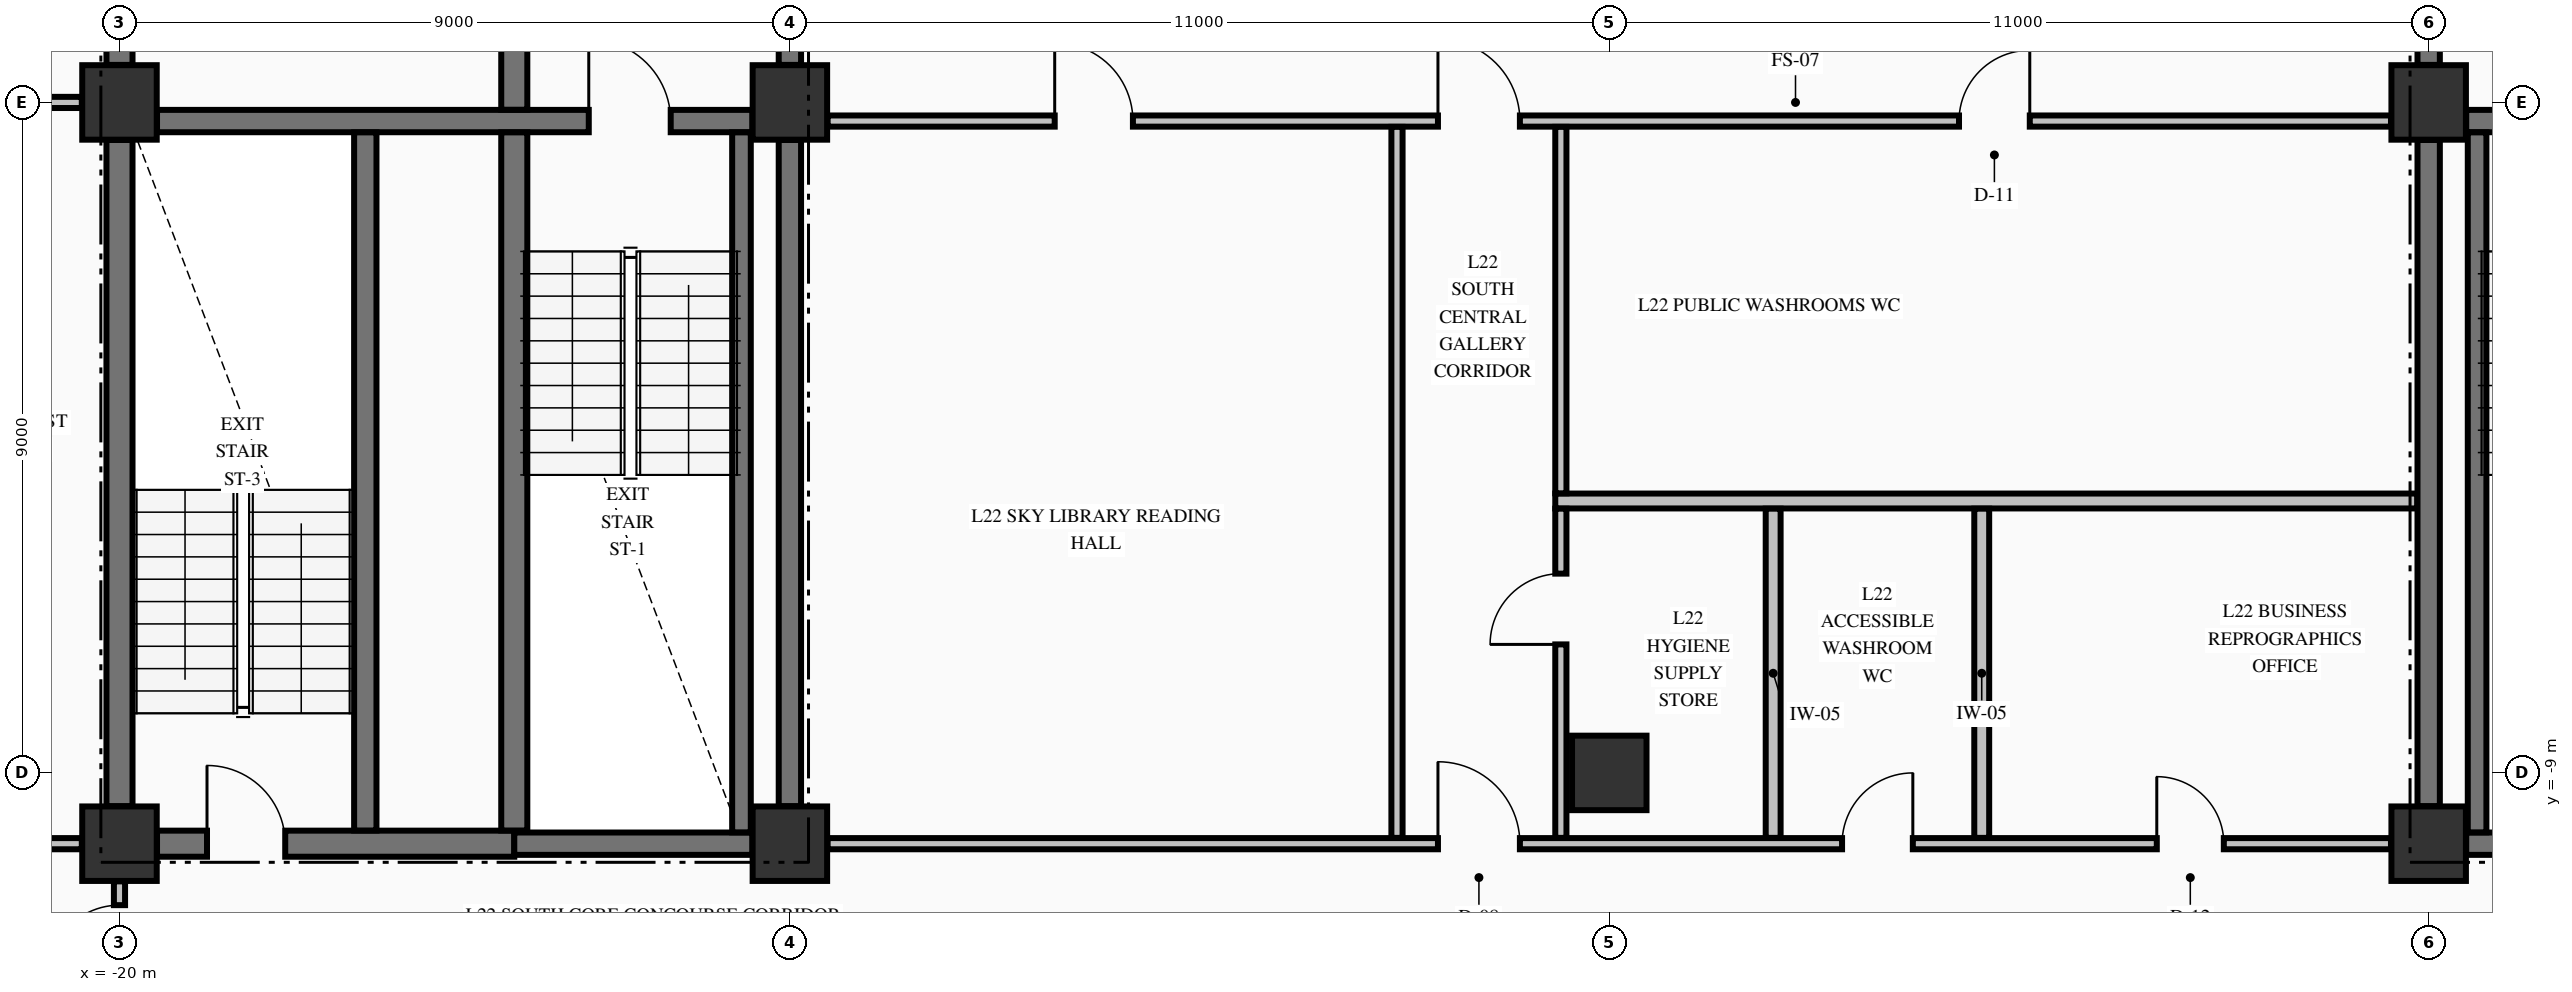
"""IFC4 building model, lengths in metres.
Left out: names, types, materials, properties, quantities, classifications, styles, units other than length and angle.
Written with IfcOpenShell. Run it as: python <this file> out.ifc"""

import sys

from ifc_helpers import new_model, si_unit, direction, frame, frame_2d, origin, origin_2d, place, context, subcontext, project, spatial, rectangle, extrude, element, fill, save


model = new_model("IFC4")
c1 = context("Model", 3, precision=1e-05, world=origin(), true_north=direction((0.0, 1.0)))
c2 = subcontext(c1, "Body", "Model", "MODEL_VIEW")
j1 = project(units=[si_unit("LENGTHUNIT", "METRE"), si_unit("PLANEANGLEUNIT", "RADIAN")], contexts=[c1])
p1 = place(None, origin())
s1 = spatial("IfcSite", under=j1, at=p1, CompositionType="ELEMENT")
p2 = place(p1, origin())
s2 = spatial("IfcBuilding", under=s1, at=p2, CompositionType="ELEMENT")
p3 = place(p2, frame((0.0, 0.0, 91.36)))
s3 = spatial("IfcBuildingStorey", under=s2, at=p3, CompositionType="ELEMENT", Elevation=91.36)
for number, where, z_axis, x_axis in (
    (1, (-20.0, -9.95, -0.25), (0.0, 0.0, 1.0), (1.0, 0.0, 0.0)),
    (2, (-11.0, -9.95, -0.25), (0.0, 0.0, 1.0), (1.0, 0.0, 0.0)),
    (3, (-11.0, 0.0, -0.25), (0.0, 0.0, 1.0), (1.0, 0.0, 0.0)),
    (4, (11.0, -9.95, -0.25), (0.0, 0.0, 1.0), (1.0, 0.0, 0.0)),
    (5, (11.0, 0.0, -0.25), (0.0, 0.0, 1.0), (1.0, 0.0, 0.0)),
    (6, (0.0, -9.0, -0.25), (0.0, 0.0, 1.0), (1.0, 0.0, 0.0)),
    (7, (-20.0, 0.0, -0.25), (0.0, 0.0, 1.0), (1.0, 0.0, 0.0)),
):
    element("IfcColumn", number, at=place(p3, frame(where, z_axis=z_axis, x_axis=x_axis)), inside=s3, PredefinedType="COLUMN", context=c2, shape_type="SweptSolid", body=[
        extrude(rectangle(XDim=1.0, YDim=1.0, at=origin_2d()), origin(), (0.0, 0.0, 1.0), 3.57),
    ])
p4 = place(p3, frame((-19.496, -9.95, 0.0), z_axis=(0.0, 0.0, 1.0), x_axis=(1.0, 0.0, 0.0)))
e8 = element("IfcWall", 8, at=p4, inside=s3, PredefinedType="SHEAR", context=c2, shape_type="SweptSolid", body=[
    extrude(rectangle(XDim=4.796, YDim=0.35, at=frame_2d((2.398, 0.0))), origin(), (0.0, 0.0, 1.0), 3.32),
])
p5 = place(p4, frame((0.671, 0.0, 0.0)))
e9 = element("IfcOpeningElement", 9, at=p5, cuts=e8, PredefinedType="OPENING", context=c2, shape_type="SweptSolid", body=[
    extrude(rectangle(XDim=1.05, YDim=2.15, at=frame_2d((0.525, 1.075))), frame((0.0, 0.185, 0.0), z_axis=(0.0, -1.0, 0.0), x_axis=(1.0, 0.0, 0.0)), (0.0, 0.0, 1.0), 0.37),
])
for number, where, z_axis, x_axis in (
    (10, (-14.7, -9.95, 0.0), (0.0, 0.0, 1.0), (1.0, 0.0, 0.0)),
    (11, (11.504, -9.95, 0.0), (0.0, 0.0, 1.0), (1.0, 0.0, 0.0)),
):
    element("IfcWall", number, at=place(p3, frame(where, z_axis=z_axis, x_axis=x_axis)), inside=s3, PredefinedType="SHEAR", context=c2, shape_type="SweptSolid", body=[
        extrude(rectangle(XDim=3.196, YDim=0.3, at=frame_2d((1.598, 0.0))), origin(), (0.0, 0.0, 1.0), 3.32),
    ])
p6 = place(p3, frame((-19.496, -0.25, 0.0), z_axis=(0.0, 0.0, 1.0), x_axis=(1.0, 0.0, 0.0)))
e12 = element("IfcWall", 12, at=p6, inside=s3, PredefinedType="SHEAR", context=c2, shape_type="SweptSolid", body=[
    extrude(rectangle(XDim=7.992, YDim=0.3, at=frame_2d((3.996, 0.0))), origin(), (0.0, 0.0, 1.0), 3.32),
])
p7 = place(p6, frame((5.796, 0.0, 0.0)))
e13 = element("IfcOpeningElement", 13, at=p7, cuts=e12, PredefinedType="OPENING", context=c2, shape_type="SweptSolid", body=[
    extrude(rectangle(XDim=1.1, YDim=2.15, at=frame_2d((0.55, 1.075))), frame((0.0, 0.16, 0.0), z_axis=(0.0, -1.0, 0.0), x_axis=(1.0, 0.0, 0.0)), (0.0, 0.0, 1.0), 0.32),
])
p8 = place(p3, frame((11.504, -0.25, 0.0), z_axis=(0.0, 0.0, 1.0), x_axis=(1.0, 0.0, 0.0)))
e14 = element("IfcWall", 14, at=p8, inside=s3, PredefinedType="SHEAR", context=c2, shape_type="SweptSolid", body=[
    extrude(rectangle(XDim=3.371, YDim=0.3, at=frame_2d((1.686, 0.0))), origin(), (0.0, 0.0, 1.0), 3.32),
])
p9 = place(p8, frame((1.096, 0.0, 0.0)))
e15 = element("IfcOpeningElement", 15, at=p9, cuts=e14, PredefinedType="OPENING", context=c2, shape_type="SweptSolid", body=[
    extrude(rectangle(XDim=1.1, YDim=2.15, at=frame_2d((0.55, 1.075))), frame((0.0, 0.16, 0.0), z_axis=(0.0, -1.0, 0.0), x_axis=(1.0, 0.0, 0.0)), (0.0, 0.0, 1.0), 0.32),
])
p10 = place(p3, frame((-22.835, -9.95, 0.0), z_axis=(0.0, 0.0, 1.0), x_axis=(1.0, 0.0, 0.0)))
e16 = element("IfcWall", 16, at=p10, inside=s3, PredefinedType="PARTITIONING", context=c2, shape_type="SweptSolid", body=[
    extrude(rectangle(XDim=2.329, YDim=0.15, at=frame_2d((1.165, 0.0))), origin(), (0.0, 0.0, 1.0), 3.32),
])
p11 = place(p10, frame((0.86, 0.0, 0.0)))
e17 = element("IfcOpeningElement", 17, at=p11, cuts=e16, PredefinedType="OPENING", context=c2, shape_type="SweptSolid", body=[
    extrude(rectangle(XDim=0.95, YDim=2.15, at=frame_2d((0.475, 1.075))), frame((0.0, 0.085, 0.0), z_axis=(0.0, -1.0, 0.0), x_axis=(1.0, 0.0, 0.0)), (0.0, 0.0, 1.0), 0.17),
])
p12 = place(p3, frame((-10.494, -9.95, 0.0), z_axis=(0.0, 0.0, 1.0), x_axis=(1.0, 0.0, 0.0)))
e18 = element("IfcWall", 18, at=p12, inside=s3, PredefinedType="PARTITIONING", context=c2, shape_type="SweptSolid", body=[
    extrude(rectangle(XDim=20.988, YDim=0.15, at=frame_2d((10.494, 0.0))), origin(), (0.0, 0.0, 1.0), 3.32),
])
p13 = place(p12, frame((8.194, 0.0, 0.0)))
e19 = element("IfcOpeningElement", 19, at=p13, cuts=e18, PredefinedType="OPENING", context=c2, shape_type="SweptSolid", body=[
    extrude(rectangle(XDim=1.1, YDim=2.15, at=frame_2d((0.55, 1.075))), frame((0.0, 0.085, 0.0), z_axis=(0.0, -1.0, 0.0), x_axis=(1.0, 0.0, 0.0)), (0.0, 0.0, 1.0), 0.17),
])
p14 = place(p12, frame((13.619, 0.0, 0.0)))
e20 = element("IfcOpeningElement", 20, at=p14, cuts=e18, PredefinedType="OPENING", context=c2, shape_type="SweptSolid", body=[
    extrude(rectangle(XDim=0.95, YDim=2.15, at=frame_2d((0.475, 1.075))), frame((0.0, 0.085, 0.0), z_axis=(0.0, -1.0, 0.0), x_axis=(1.0, 0.0, 0.0)), (0.0, 0.0, 1.0), 0.17),
])
p15 = place(p12, frame((17.844, 0.0, 0.0)))
e21 = element("IfcOpeningElement", 21, at=p15, cuts=e18, PredefinedType="OPENING", context=c2, shape_type="SweptSolid", body=[
    extrude(rectangle(XDim=0.9, YDim=2.15, at=frame_2d((0.45, 1.075))), frame((0.0, 0.085, 0.0), z_axis=(0.0, -1.0, 0.0), x_axis=(1.0, 0.0, 0.0)), (0.0, 0.0, 1.0), 0.17),
])
p16 = place(p3, frame((-0.725, -5.35, 0.0), z_axis=(0.0, 0.0, 1.0), x_axis=(1.0, 0.0, 0.0)))
e22 = element("IfcWall", 22, at=p16, inside=s3, PredefinedType="PARTITIONING", context=c2, shape_type="SweptSolid", body=[
    extrude(rectangle(XDim=11.572, YDim=0.2, at=frame_2d((5.786, 0.0))), origin(), (0.0, 0.0, 1.0), 3.32),
])
p17 = place(p3, frame((-10.494, -0.25, 0.0), z_axis=(0.0, 0.0, 1.0), x_axis=(1.0, 0.0, 0.0)))
e23 = element("IfcWall", 23, at=p17, inside=s3, PredefinedType="PARTITIONING", context=c2, shape_type="SweptSolid", body=[
    extrude(rectangle(XDim=20.988, YDim=0.15, at=frame_2d((10.494, 0.0))), origin(), (0.0, 0.0, 1.0), 3.32),
])
p18 = place(p17, frame((8.194, 0.0, 0.0)))
e24 = element("IfcOpeningElement", 24, at=p18, cuts=e23, PredefinedType="OPENING", context=c2, shape_type="SweptSolid", body=[
    extrude(rectangle(XDim=1.1, YDim=2.15, at=frame_2d((0.55, 1.075))), frame((0.0, 0.085, 0.0), z_axis=(0.0, -1.0, 0.0), x_axis=(1.0, 0.0, 0.0)), (0.0, 0.0, 1.0), 0.17),
])
p19 = place(p17, frame((3.049, 0.0, 0.0)))
e25 = element("IfcOpeningElement", 25, at=p19, cuts=e23, PredefinedType="OPENING", context=c2, shape_type="SweptSolid", body=[
    extrude(rectangle(XDim=1.05, YDim=2.15, at=frame_2d((0.525, 1.075))), frame((0.0, 0.085, 0.0), z_axis=(0.0, -1.0, 0.0), x_axis=(1.0, 0.0, 0.0)), (0.0, 0.0, 1.0), 0.17),
])
p20 = place(p17, frame((15.189, 0.0, 0.0)))
e26 = element("IfcOpeningElement", 26, at=p20, cuts=e23, PredefinedType="OPENING", context=c2, shape_type="SweptSolid", body=[
    extrude(rectangle(XDim=0.95, YDim=2.15, at=frame_2d((0.475, 1.075))), frame((0.0, 0.085, 0.0), z_axis=(0.0, -1.0, 0.0), x_axis=(1.0, 0.0, 0.0)), (0.0, 0.0, 1.0), 0.17),
])
p21 = place(p3, frame((-22.394, 0.0, 0.0), z_axis=(0.0, 0.0, 1.0), x_axis=(1.0, 0.0, 0.0)))
e27 = element("IfcWall", 27, at=p21, inside=s3, PredefinedType="PARTITIONING", context=c2, shape_type="SweptSolid", body=[
    extrude(rectangle(XDim=1.888, YDim=0.15, at=frame_2d((0.944, 0.0))), origin(), (0.0, 0.0, 1.0), 2.81),
])
p22 = place(p3, frame((-20.0, -9.446, 0.0), z_axis=(0.0, 0.0, 1.0), x_axis=(0.0, 1.0, 0.0)))
e28 = element("IfcWall", 28, at=p22, inside=s3, PredefinedType="SHEAR", context=c2, shape_type="SweptSolid", body=[
    extrude(rectangle(XDim=8.942, YDim=0.35, at=frame_2d((4.471, 0.0))), origin(), (0.0, 0.0, 1.0), 3.32),
])
p23 = place(p3, frame((-20.0, 0.504, 0.0), z_axis=(0.0, 0.0, 1.0), x_axis=(0.0, 1.0, 0.0)))
e29 = element("IfcWall", 29, at=p23, inside=s3, PredefinedType="SHEAR", context=c2, shape_type="SweptSolid", body=[
    extrude(rectangle(XDim=9.492, YDim=0.35, at=frame_2d((4.746, 0.0))), origin(), (0.0, 0.0, 1.0), 3.32),
])
p24 = place(p3, frame((-16.7, -9.773, 0.0), z_axis=(0.0, 0.0, 1.0), x_axis=(0.0, 1.0, 0.0)))
e30 = element("IfcWall", 30, at=p24, inside=s3, PredefinedType="SHEAR", context=c2, shape_type="SweptSolid", body=[
    extrude(rectangle(XDim=9.371, YDim=0.3, at=frame_2d((4.686, 0.0))), origin(), (0.0, 0.0, 1.0), 3.32),
])
p25 = place(p3, frame((-14.7, -9.773, 0.0), z_axis=(0.0, 0.0, 1.0), x_axis=(0.0, 1.0, 0.0)))
e31 = element("IfcWall", 31, at=p25, inside=s3, PredefinedType="SHEAR", context=c2, shape_type="SweptSolid", body=[
    extrude(rectangle(XDim=9.371, YDim=0.35, at=frame_2d((4.686, 0.0))), origin(), (0.0, 0.0, 1.0), 3.32),
])
p26 = place(p3, frame((-14.7, -0.098, 0.0), z_axis=(0.0, 0.0, 1.0), x_axis=(0.0, 1.0, 0.0)))
e32 = element("IfcWall", 32, at=p26, inside=s3, PredefinedType="SHEAR", context=c2, shape_type="SweptSolid", body=[
    extrude(rectangle(XDim=2.846, YDim=0.35, at=frame_2d((1.423, 0.0))), origin(), (0.0, 0.0, 1.0), 3.32),
])
p27 = place(p3, frame((-11.65, -9.798, 0.0), z_axis=(0.0, 0.0, 1.0), x_axis=(0.0, 1.0, 0.0)))
e33 = element("IfcWall", 33, at=p27, inside=s3, PredefinedType="SOLIDWALL", context=c2, shape_type="SweptSolid", body=[
    extrude(rectangle(XDim=9.396, YDim=0.25, at=frame_2d((4.698, 0.0))), origin(), (0.0, 0.0, 1.0), 3.32),
])
p28 = place(p3, frame((-11.0, -9.446, 0.0), z_axis=(0.0, 0.0, 1.0), x_axis=(0.0, 1.0, 0.0)))
e34 = element("IfcWall", 34, at=p28, inside=s3, PredefinedType="SHEAR", context=c2, shape_type="SweptSolid", body=[
    extrude(rectangle(XDim=8.942, YDim=0.3, at=frame_2d((4.471, 0.0))), origin(), (0.0, 0.0, 1.0), 3.32),
])
p29 = place(p3, frame((-11.0, 0.504, 0.0), z_axis=(0.0, 0.0, 1.0), x_axis=(0.0, 1.0, 0.0)))
e35 = element("IfcWall", 35, at=p29, inside=s3, PredefinedType="SHEAR", context=c2, shape_type="SweptSolid", body=[
    extrude(rectangle(XDim=2.244, YDim=0.3, at=frame_2d((1.122, 0.0))), origin(), (0.0, 0.0, 1.0), 3.32),
])
p30 = place(p29, frame((0.596, 0.0, 0.0)))
e36 = element("IfcOpeningElement", 36, at=p30, cuts=e35, PredefinedType="OPENING", context=c2, shape_type="SweptSolid", body=[
    extrude(rectangle(XDim=1.1, YDim=2.15, at=frame_2d((0.55, 1.075))), frame((0.0, 0.16, 0.0), z_axis=(0.0, -1.0, 0.0), x_axis=(1.0, 0.0, 0.0)), (0.0, 0.0, 1.0), 0.32),
])
p31 = place(p3, frame((11.0, -9.446, 0.0), z_axis=(0.0, 0.0, 1.0), x_axis=(0.0, 1.0, 0.0)))
e37 = element("IfcWall", 37, at=p31, inside=s3, PredefinedType="SHEAR", context=c2, shape_type="SweptSolid", body=[
    extrude(rectangle(XDim=8.942, YDim=0.3, at=frame_2d((4.471, 0.0))), origin(), (0.0, 0.0, 1.0), 3.32),
])
p32 = place(p3, frame((11.0, 0.504, 0.0), z_axis=(0.0, 0.0, 1.0), x_axis=(0.0, 1.0, 0.0)))
e38 = element("IfcWall", 38, at=p32, inside=s3, PredefinedType="SHEAR", context=c2, shape_type="SweptSolid", body=[
    extrude(rectangle(XDim=2.244, YDim=0.3, at=frame_2d((1.122, 0.0))), origin(), (0.0, 0.0, 1.0), 3.32),
])
p33 = place(p32, frame((0.596, 0.0, 0.0)))
e39 = element("IfcOpeningElement", 39, at=p33, cuts=e38, PredefinedType="OPENING", context=c2, shape_type="SweptSolid", body=[
    extrude(rectangle(XDim=1.1, YDim=2.15, at=frame_2d((0.55, 1.075))), frame((0.0, 0.16, 0.0), z_axis=(0.0, -1.0, 0.0), x_axis=(1.0, 0.0, 0.0)), (0.0, 0.0, 1.0), 0.32),
])
p34 = place(p3, frame((11.65, -9.798, 0.0), z_axis=(0.0, 0.0, 1.0), x_axis=(0.0, 1.0, 0.0)))
e40 = element("IfcWall", 40, at=p34, inside=s3, PredefinedType="SOLIDWALL", context=c2, shape_type="SweptSolid", body=[
    extrude(rectangle(XDim=9.396, YDim=0.25, at=frame_2d((4.698, 0.0))), origin(), (0.0, 0.0, 1.0), 3.32),
])
p35 = place(p3, frame((-20.0, -12.472, 0.0), z_axis=(0.0, 0.0, 1.0), x_axis=(0.0, 1.0, 0.0)))
e41 = element("IfcWall", 41, at=p35, inside=s3, PredefinedType="PARTITIONING", context=c2, shape_type="SweptSolid", body=[
    extrude(rectangle(XDim=2.016, YDim=0.15, at=frame_2d((1.008, 0.0))), origin(), (0.0, 0.0, 1.0), 2.81),
])
p36 = place(p35, frame((0.747, 0.0, 0.0)))
e42 = element("IfcOpeningElement", 42, at=p36, cuts=e41, PredefinedType="OPENING", context=c2, shape_type="SweptSolid", body=[
    extrude(rectangle(XDim=0.95, YDim=2.15, at=frame_2d((0.475, 1.075))), frame((0.0, 0.085, 0.0), z_axis=(0.0, -1.0, 0.0), x_axis=(1.0, 0.0, 0.0)), (0.0, 0.0, 1.0), 0.17),
])
p37 = place(p3, frame((-2.85, -9.872, 0.0), z_axis=(0.0, 0.0, 1.0), x_axis=(0.0, 1.0, 0.0)))
e43 = element("IfcWall", 43, at=p37, inside=s3, PredefinedType="PARTITIONING", context=c2, shape_type="SweptSolid", body=[
    extrude(rectangle(XDim=9.544, YDim=0.15, at=frame_2d((4.772, 0.0))), origin(), (0.0, 0.0, 1.0), 3.32),
])
p38 = place(p3, frame((-0.65, -9.872, 0.0), z_axis=(0.0, 0.0, 1.0), x_axis=(0.0, 1.0, 0.0)))
e44 = element("IfcWall", 44, at=p38, inside=s3, PredefinedType="PARTITIONING", context=c2, shape_type="SweptSolid", body=[
    extrude(rectangle(XDim=4.419, YDim=0.15, at=frame_2d((2.209, 0.0))), origin(), (0.0, 0.0, 1.0), 3.32),
])
p39 = place(p38, frame((2.597, 0.0, 0.0)))
e45 = element("IfcOpeningElement", 45, at=p39, cuts=e44, PredefinedType="OPENING", context=c2, shape_type="SweptSolid", body=[
    extrude(rectangle(XDim=0.95, YDim=2.15, at=frame_2d((0.475, 1.075))), frame((0.0, 0.085, 0.0), z_axis=(0.0, -1.0, 0.0), x_axis=(1.0, 0.0, 0.0)), (0.0, 0.0, 1.0), 0.17),
])
p40 = place(p3, frame((-0.65, -5.247, 0.0), z_axis=(0.0, 0.0, 1.0), x_axis=(0.0, 1.0, 0.0)))
e46 = element("IfcWall", 46, at=p40, inside=s3, PredefinedType="PARTITIONING", context=c2, shape_type="SweptSolid", body=[
    extrude(rectangle(XDim=4.919, YDim=0.15, at=frame_2d((2.459, 0.0))), origin(), (0.0, 0.0, 1.0), 3.32),
])
for number, where, z_axis, x_axis in (
    (47, (2.2, -9.872, 0.0), (0.0, 0.0, 1.0), (0.0, 1.0, 0.0)),
    (48, (5.0, -9.872, 0.0), (0.0, 0.0, 1.0), (0.0, 1.0, 0.0)),
):
    element("IfcWall", number, at=place(p3, frame(where, z_axis=z_axis, x_axis=x_axis)), inside=s3, PredefinedType="PARTITIONING", context=c2, shape_type="SweptSolid", body=[
        extrude(rectangle(XDim=4.419, YDim=0.2, at=frame_2d((2.209, 0.0))), origin(), (0.0, 0.0, 1.0), 3.32),
    ])
p41 = place(p7, origin())
e49 = element("IfcDoor", 49, at=p41, inside=s3, OperationType="SINGLE_SWING_LEFT", PredefinedType="DOOR", context=c2, shape_type="SweptSolid", body=[
    extrude(rectangle(XDim=1.1, YDim=2.15, at=frame_2d((0.55, 1.075))), frame((0.0, 0.025, 0.0), z_axis=(0.0, -1.0, 0.0), x_axis=(1.0, 0.0, 0.0)), (0.0, 0.0, 1.0), 0.05),
])
fill(e13, e49)
p42 = place(p5, origin())
e50 = element("IfcDoor", 50, at=p42, inside=s3, OperationType="SINGLE_SWING_LEFT", PredefinedType="DOOR", context=c2, shape_type="SweptSolid", body=[
    extrude(rectangle(XDim=1.05, YDim=2.15, at=frame_2d((0.525, 1.075))), frame((0.0, 0.025, 0.0), z_axis=(0.0, -1.0, 0.0), x_axis=(1.0, 0.0, 0.0)), (0.0, 0.0, 1.0), 0.05),
])
fill(e9, e50)
p43 = place(p13, origin())
e51 = element("IfcDoor", 51, at=p43, inside=s3, OperationType="SINGLE_SWING_LEFT", PredefinedType="DOOR", context=c2, shape_type="SweptSolid", body=[
    extrude(rectangle(XDim=1.1, YDim=2.15, at=frame_2d((0.55, 1.075))), frame((0.0, 0.025, 0.0), z_axis=(0.0, -1.0, 0.0), x_axis=(1.0, 0.0, 0.0)), (0.0, 0.0, 1.0), 0.05),
])
fill(e19, e51)
p44 = place(p18, origin())
e52 = element("IfcDoor", 52, at=p44, inside=s3, OperationType="SINGLE_SWING_LEFT", PredefinedType="DOOR", context=c2, shape_type="SweptSolid", body=[
    extrude(rectangle(XDim=1.1, YDim=2.15, at=frame_2d((0.55, 1.075))), frame((0.0, 0.025, 0.0), z_axis=(0.0, -1.0, 0.0), x_axis=(1.0, 0.0, 0.0)), (0.0, 0.0, 1.0), 0.05),
])
fill(e24, e52)
p45 = place(p19, origin())
e53 = element("IfcDoor", 53, at=p45, inside=s3, OperationType="SINGLE_SWING_LEFT", PredefinedType="DOOR", context=c2, shape_type="SweptSolid", body=[
    extrude(rectangle(XDim=1.05, YDim=2.15, at=frame_2d((0.525, 1.075))), frame((0.0, 0.025, 0.0), z_axis=(0.0, -1.0, 0.0), x_axis=(1.0, 0.0, 0.0)), (0.0, 0.0, 1.0), 0.05),
])
fill(e25, e53)
p46 = place(p20, origin())
e54 = element("IfcDoor", 54, at=p46, inside=s3, OperationType="SINGLE_SWING_RIGHT", PredefinedType="DOOR", context=c2, shape_type="SweptSolid", body=[
    extrude(rectangle(XDim=0.95, YDim=2.15, at=frame_2d((0.475, 1.075))), frame((0.0, 0.025, 0.0), z_axis=(0.0, -1.0, 0.0), x_axis=(1.0, 0.0, 0.0)), (0.0, 0.0, 1.0), 0.05),
])
fill(e26, e54)
p47 = place(p39, origin())
e55 = element("IfcDoor", 55, at=p47, inside=s3, OperationType="SINGLE_SWING_LEFT", PredefinedType="DOOR", context=c2, shape_type="SweptSolid", body=[
    extrude(rectangle(XDim=0.95, YDim=2.15, at=frame_2d((0.475, 1.075))), frame((0.0, 0.025, 0.0), z_axis=(0.0, -1.0, 0.0), x_axis=(1.0, 0.0, 0.0)), (0.0, 0.0, 1.0), 0.05),
])
fill(e45, e55)
p48 = place(p14, origin())
e56 = element("IfcDoor", 56, at=p48, inside=s3, OperationType="SINGLE_SWING_RIGHT", PredefinedType="DOOR", context=c2, shape_type="SweptSolid", body=[
    extrude(rectangle(XDim=0.95, YDim=2.15, at=frame_2d((0.475, 1.075))), frame((0.0, 0.025, 0.0), z_axis=(0.0, -1.0, 0.0), x_axis=(1.0, 0.0, 0.0)), (0.0, 0.0, 1.0), 0.05),
])
fill(e20, e56)
p49 = place(p15, origin())
e57 = element("IfcDoor", 57, at=p49, inside=s3, OperationType="SINGLE_SWING_LEFT", PredefinedType="DOOR", context=c2, shape_type="SweptSolid", body=[
    extrude(rectangle(XDim=0.9, YDim=2.15, at=frame_2d((0.45, 1.075))), frame((0.0, 0.025, 0.0), z_axis=(0.0, -1.0, 0.0), x_axis=(1.0, 0.0, 0.0)), (0.0, 0.0, 1.0), 0.05),
])
fill(e21, e57)
p50 = place(p36, origin())
e58 = element("IfcDoor", 58, at=p50, inside=s3, OperationType="SINGLE_SWING_LEFT", PredefinedType="DOOR", context=c2, shape_type="SweptSolid", body=[
    extrude(rectangle(XDim=0.95, YDim=2.15, at=frame_2d((0.475, 1.075))), frame((0.0, 0.025, 0.0), z_axis=(0.0, -1.0, 0.0), x_axis=(1.0, 0.0, 0.0)), (0.0, 0.0, 1.0), 0.05),
])
fill(e42, e58)
save(model, sys.argv[1])
